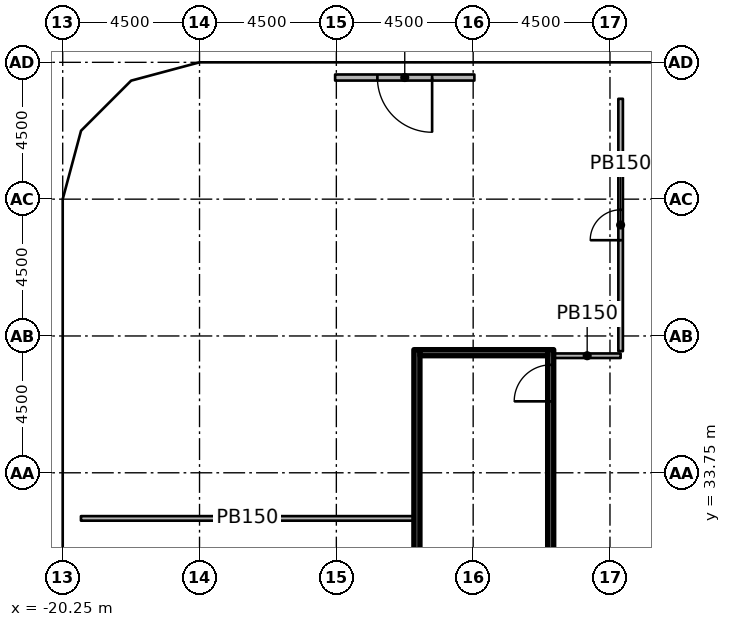
"""IFC4 building model, lengths in metres.
Left out: names, types, materials, properties, quantities, classifications, styles, units other than length and angle.
Written with IfcOpenShell. Run it as: python <this file> out.ifc"""

import sys

from ifc_helpers import new_model, si_unit, direction, frame, frame_2d, origin, origin_2d, place, context, subcontext, project, spatial, rectangle, extrude, element, fill, save


model = new_model("IFC4")
c1 = context("Model", 3, precision=1e-05, world=origin(), true_north=direction((0.0, 1.0)))
c2 = subcontext(c1, "Body", "Model", "MODEL_VIEW")
j1 = project(units=[si_unit("LENGTHUNIT", "METRE"), si_unit("PLANEANGLEUNIT", "RADIAN")], contexts=[c1])
p1 = place(None, origin())
s1 = spatial("IfcSite", under=j1, at=p1, CompositionType="ELEMENT")
p2 = place(p1, origin())
s2 = spatial("IfcBuilding", under=s1, at=p2, CompositionType="ELEMENT")
p3 = place(p2, frame((0.0, 0.0, 12.0)))
s3 = spatial("IfcBuildingStorey", under=s2, at=p3, CompositionType="ELEMENT", Elevation=12.0)
for number, where, z_axis, x_axis in (
    (1, (-19.65, 38.25, 0.0), (0.0, 0.0, 1.0), (1.0, 0.0, 0.0)),
    (2, (-15.15, 33.75, 0.0), (0.0, 0.0, 1.0), (1.0, 0.0, 0.0)),
    (3, (-15.75, 46.47, 0.0), (0.0, 0.0, 1.0), (1.0, 0.0, 0.0)),
    (4, (-11.25, 41.97, 0.0), (0.0, 0.0, 1.0), (1.0, 0.0, 0.0)),
    (5, (-2.25, 33.11, 0.0), (0.0, 0.0, 1.0), (1.0, 0.0, 0.0)),
    (6, (-2.25, 46.65, 0.0), (0.0, 0.0, 1.0), (1.0, 0.0, 0.0)),
):
    element("IfcColumn", number, at=place(p3, frame(where, z_axis=z_axis, x_axis=x_axis)), inside=s3, PredefinedType="COLUMN", context=c2, shape_type="SweptSolid", body=[
        extrude(rectangle(XDim=1.2, YDim=1.2, at=origin_2d()), origin(), (0.0, 0.0, 1.0), 4.55),
    ])
p4 = place(p3, frame((-6.71, 46.75, 0.0), z_axis=(0.0, 0.0, 1.0), x_axis=(-1.0, 0.0, 0.0)))
e7 = element("IfcWall", 7, at=p4, inside=s3, PredefinedType="SOLIDWALL", context=c2, shape_type="SweptSolid", body=[
    extrude(rectangle(XDim=4.58, YDim=0.2, at=frame_2d((2.29, 0.0))), origin(), (0.0, 0.0, 1.0), 4.55),
])
p5 = place(p4, frame((1.39, 0.0, 0.0)))
e8 = element("IfcOpeningElement", 8, at=p5, cuts=e7, PredefinedType="OPENING", context=c2, shape_type="SweptSolid", body=[
    extrude(rectangle(XDim=1.8, YDim=2.4, at=frame_2d((0.9, 1.2))), frame((0.0, 0.11, 0.0), z_axis=(0.0, -1.0, 0.0), x_axis=(1.0, 0.0, 0.0)), (0.0, 0.0, 1.0), 0.22),
])
p6 = place(p3, frame((-8.6, 29.8, 0.0), z_axis=(0.0, 0.0, 1.0), x_axis=(0.0, 1.0, 0.0)))
e9 = element("IfcWall", 9, at=p6, inside=s3, PredefinedType="SHEAR", context=c2, shape_type="SweptSolid", body=[
    extrude(rectangle(XDim=8.0, YDim=0.2, at=frame_2d((4.0, 0.0))), origin(), (0.0, 0.0, 1.0), 4.55),
])
p7 = place(p3, frame((-4.2, 29.8, 0.0), z_axis=(0.0, 0.0, 1.0), x_axis=(0.0, 1.0, 0.0)))
e10 = element("IfcWall", 10, at=p7, inside=s3, PredefinedType="SHEAR", context=c2, shape_type="SweptSolid", body=[
    extrude(rectangle(XDim=8.0, YDim=0.2, at=frame_2d((4.0, 0.0))), origin(), (0.0, 0.0, 1.0), 4.55),
])
p8 = place(p7, frame((6.3, 0.0, 0.0)))
e11 = element("IfcOpeningElement", 11, at=p8, cuts=e10, PredefinedType="OPENING", context=c2, shape_type="SweptSolid", body=[
    extrude(rectangle(XDim=1.2, YDim=2.1, at=frame_2d((0.6, 1.05))), frame((0.0, 0.11, 0.0), z_axis=(0.0, -1.0, 0.0), x_axis=(1.0, 0.0, 0.0)), (0.0, 0.0, 1.0), 0.22),
])
p9 = place(p3, frame((-8.5, 37.7, 0.0), z_axis=(0.0, 0.0, 1.0), x_axis=(1.0, 0.0, 0.0)))
e12 = element("IfcWall", 12, at=p9, inside=s3, PredefinedType="SHEAR", context=c2, shape_type="SweptSolid", body=[
    extrude(rectangle(XDim=4.2, YDim=0.2, at=frame_2d((2.1, 0.0))), origin(), (0.0, 0.0, 1.0), 4.55),
])
p10 = place(p3, frame((-4.1, 37.6, 0.0), z_axis=(0.0, 0.0, 1.0), x_axis=(1.0, 0.0, 0.0)))
e13 = element("IfcWall", 13, at=p10, inside=s3, PredefinedType="PARTITIONING", context=c2, shape_type="SweptSolid", body=[
    extrude(rectangle(XDim=2.2, YDim=0.15, at=frame_2d((1.1, 0.0))), origin(), (0.0, 0.0, 1.0), 4.55),
])
p11 = place(p3, frame((-1.9, 37.75, 0.0), z_axis=(0.0, 0.0, 1.0), x_axis=(0.0, 1.0, 0.0)))
e14 = element("IfcWall", 14, at=p11, inside=s3, PredefinedType="PARTITIONING", context=c2, shape_type="SweptSolid", body=[
    extrude(rectangle(XDim=8.3, YDim=0.15, at=frame_2d((4.15, 0.0))), origin(), (0.0, 0.0, 1.0), 4.55),
])
p12 = place(p11, frame((3.65, 0.0, 0.0)))
e15 = element("IfcOpeningElement", 15, at=p12, cuts=e14, PredefinedType="OPENING", context=c2, shape_type="SweptSolid", body=[
    extrude(rectangle(XDim=1.0, YDim=2.1, at=frame_2d((0.5, 1.05))), frame((0.0, 0.085, 0.0), z_axis=(0.0, -1.0, 0.0), x_axis=(1.0, 0.0, 0.0)), (0.0, 0.0, 1.0), 0.17),
])
p13 = place(p3, frame((-19.65, 32.25, 0.0), z_axis=(0.0, 0.0, 1.0), x_axis=(1.0, 0.0, 0.0)))
e16 = element("IfcWall", 16, at=p13, inside=s3, PredefinedType="PARTITIONING", context=c2, shape_type="SweptSolid", body=[
    extrude(rectangle(XDim=10.95, YDim=0.15, at=frame_2d((5.475, 0.0))), origin(), (0.0, 0.0, 1.0), 4.55),
])
p14 = place(p5, origin())
e17 = element("IfcDoor", 17, at=p14, inside=s3, OperationType="SINGLE_SWING_LEFT", PredefinedType="DOOR", context=c2, shape_type="SweptSolid", body=[
    extrude(rectangle(XDim=1.8, YDim=2.4, at=frame_2d((0.9, 1.2))), frame((0.0, 0.025, 0.0), z_axis=(0.0, -1.0, 0.0), x_axis=(1.0, 0.0, 0.0)), (0.0, 0.0, 1.0), 0.05),
])
fill(e8, e17)
p15 = place(p8, origin())
e18 = element("IfcDoor", 18, at=p15, inside=s3, OperationType="SINGLE_SWING_RIGHT", PredefinedType="DOOR", context=c2, shape_type="SweptSolid", body=[
    extrude(rectangle(XDim=1.2, YDim=2.1, at=frame_2d((0.6, 1.05))), frame((0.0, 0.025, 0.0), z_axis=(0.0, -1.0, 0.0), x_axis=(1.0, 0.0, 0.0)), (0.0, 0.0, 1.0), 0.05),
])
fill(e11, e18)
p16 = place(p12, origin())
e19 = element("IfcDoor", 19, at=p16, inside=s3, OperationType="SINGLE_SWING_LEFT", PredefinedType="DOOR", context=c2, shape_type="SweptSolid", body=[
    extrude(rectangle(XDim=1.0, YDim=2.1, at=frame_2d((0.5, 1.05))), frame((0.0, 0.025, 0.0), z_axis=(0.0, -1.0, 0.0), x_axis=(1.0, 0.0, 0.0)), (0.0, 0.0, 1.0), 0.05),
])
fill(e15, e19)
save(model, sys.argv[1])
